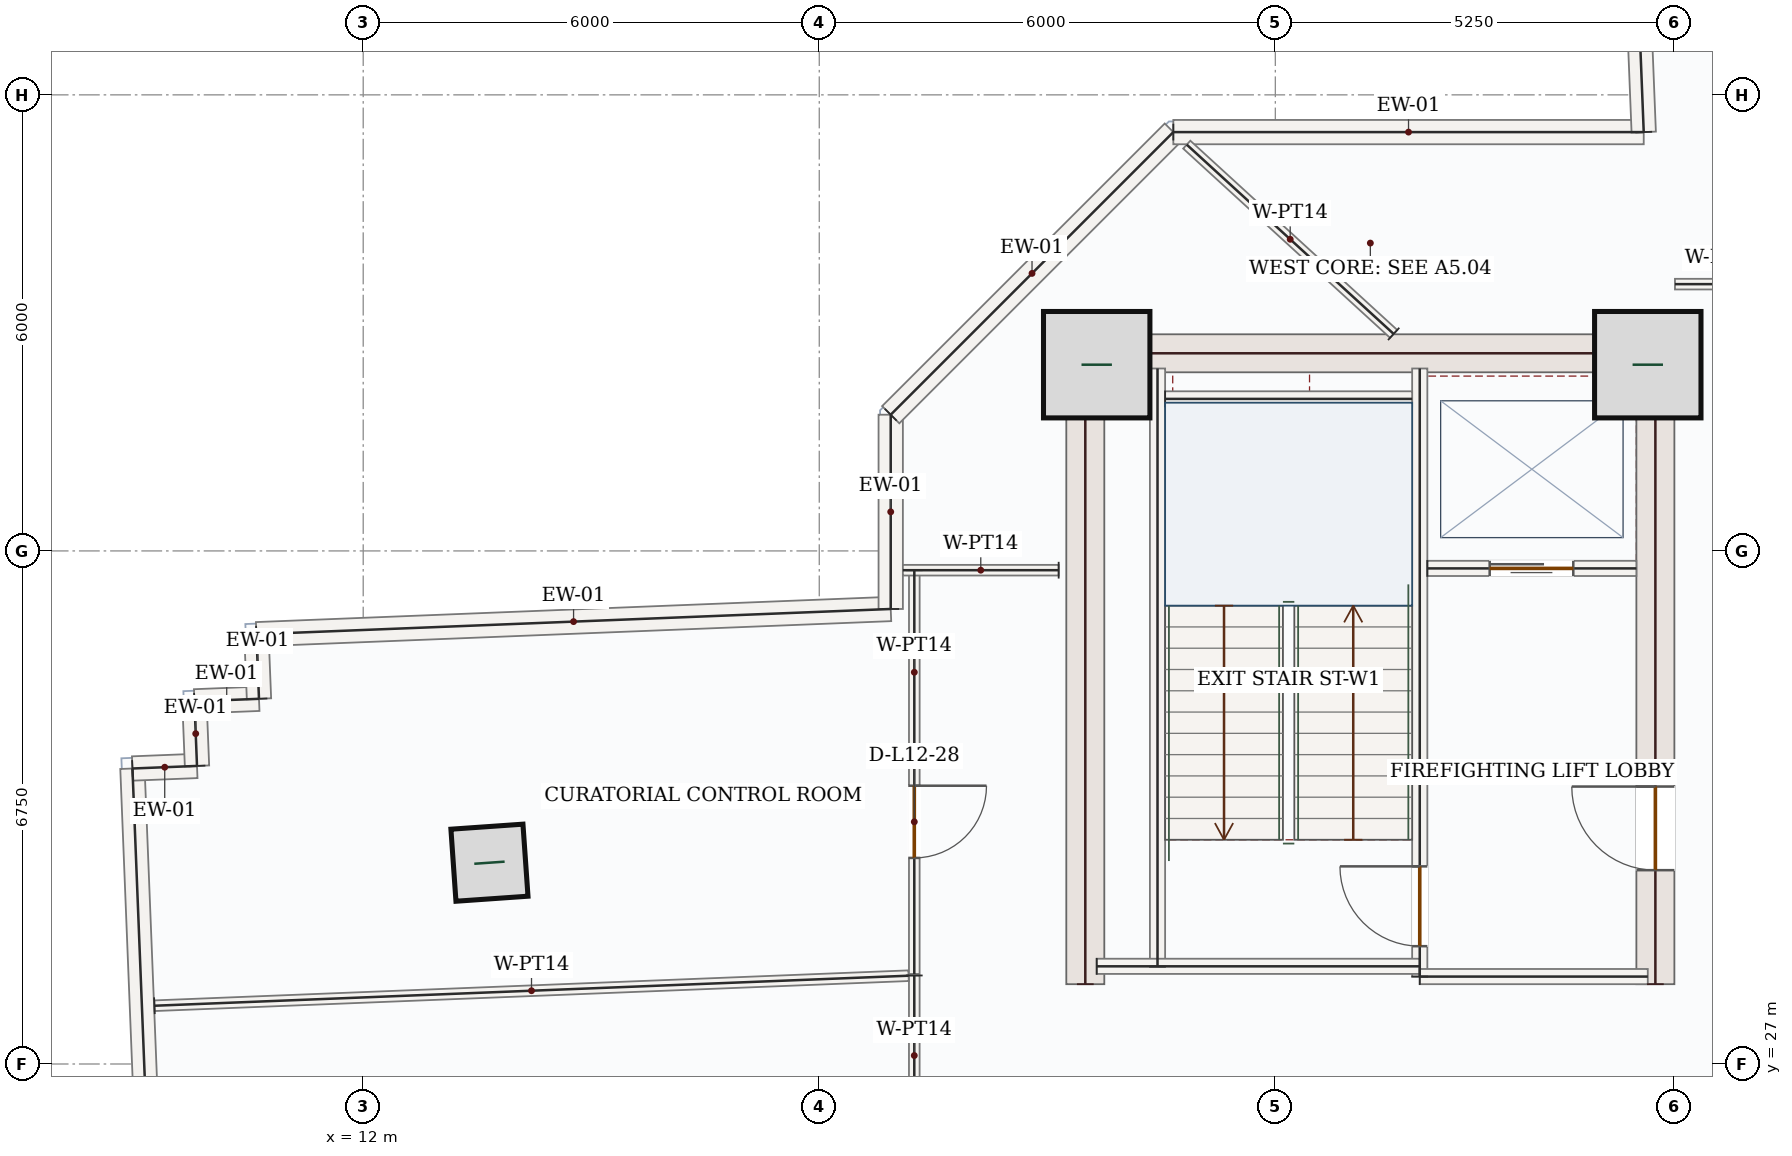
"""IFC4 building model, lengths in metres.
Left out: names, types, materials, properties, quantities, classifications, styles, units other than length and angle.
Written with IfcOpenShell. Run it as: python <this file> out.ifc"""

import sys

from ifc_helpers import new_model, si_unit, direction, frame, frame_2d, origin, origin_2d, place, context, subcontext, project, spatial, rectangle, hollow_rectangle, extrude, source, transform, mapped, element, fill, save


model = new_model("IFC4")
c1 = context("Model", 3, precision=1e-05, world=origin(), true_north=direction((0.0, 1.0)))
c2 = subcontext(c1, "Body", "Model", "MODEL_VIEW")
j1 = project(units=[si_unit("LENGTHUNIT", "METRE"), si_unit("PLANEANGLEUNIT", "RADIAN")], contexts=[c1])
p1 = place(None, origin())
s1 = spatial("IfcSite", under=j1, at=p1, CompositionType="ELEMENT")
p2 = place(p1, origin())
s2 = spatial("IfcBuilding", under=s1, at=p2, CompositionType="ELEMENT")
p3 = place(p2, frame((0.0, 0.0, 58.5)))
s3 = spatial("IfcBuildingStorey", under=s2, at=p3, CompositionType="ELEMENT", Elevation=58.5)
m1 = source(origin(), c2, "Body", "SweptSolid", [
    extrude(rectangle(XDim=8.55, YDim=0.5, at=frame_2d((4.275, 0.0))), origin(), (0.0, 0.0, 1.0), 3.95),
])
p4 = place(p3, frame((21.5, 28.05, 0.0), z_axis=(0.0, 0.0, 1.0), x_axis=(0.0, 1.0, 0.0)))
e1 = element("IfcWall", 1, at=p4, inside=s3, PredefinedType="SHEAR", context=c2, shape_type="MappedRepresentation", body=[
    mapped(m1, transform((0.0, 0.0, 0.0), x_axis=(1.0, 0.0, 0.0), y_axis=(0.0, 1.0, 0.0), z_axis=(0.0, 0.0, 1.0), scale=1.0)),
])
p5 = place(p3, frame((29.0, 28.05, 0.0), z_axis=(0.0, 0.0, 1.0), x_axis=(0.0, 1.0, 0.0)))
e2 = element("IfcWall", 2, at=p5, inside=s3, PredefinedType="SHEAR", context=c2, shape_type="SweptSolid", body=[
    extrude(rectangle(XDim=8.55, YDim=0.5, at=frame_2d((4.275, 0.0))), origin(), (0.0, 0.0, 1.0), 3.95),
])
p6 = place(p5, frame((1.5, 0.0, 0.0)))
e3 = element("IfcOpeningElement", 3, at=p6, cuts=e2, PredefinedType="OPENING", context=c2, shape_type="SweptSolid", body=[
    extrude(rectangle(XDim=1.1, YDim=2.2, at=frame_2d((0.55, 1.1))), frame((0.0, 0.26, 0.0), z_axis=(0.0, -1.0, 0.0), x_axis=(1.0, 0.0, 0.0)), (0.0, 0.0, 1.0), 0.52),
])
m2 = source(origin(), c2, "Body", "SweptSolid", [
    extrude(rectangle(XDim=7.0, YDim=0.5, at=frame_2d((3.5, 0.0))), origin(), (0.0, 0.0, 1.0), 3.95),
])
p7 = place(p3, frame((21.75, 36.35, 0.0), z_axis=(0.0, 0.0, 1.0), x_axis=(1.0, 0.0, 0.0)))
e4 = element("IfcWall", 4, at=p7, inside=s3, PredefinedType="SHEAR", context=c2, shape_type="MappedRepresentation", body=[
    mapped(m2, transform((0.0, 0.0, 0.0), x_axis=(1.0, 0.0, 0.0), y_axis=(0.0, 1.0, 0.0), z_axis=(0.0, 0.0, 1.0), scale=1.0)),
])
m3 = source(origin(), c2, "Body", "SweptSolid", [
    extrude(rectangle(XDim=1.4, YDim=1.4, at=origin_2d()), origin(), (0.0, 0.0, 1.0), 4.2),
])
for number, where, z_axis, x_axis in (
    (5, (21.65, 36.2, 0.0), (0.0, 0.0, 1.0), (1.0, 0.0, 0.0)),
    (6, (28.9, 36.2, 0.0), (0.0, 0.0, 1.0), (1.0, 0.0, 0.0)),
):
    element("IfcColumn", number, at=place(p3, frame(where, z_axis=z_axis, x_axis=x_axis)), inside=s3, PredefinedType="COLUMN", context=c2, shape_type="MappedRepresentation", body=[
        mapped(m3, transform((0.0, 0.0, 0.0), x_axis=(1.0, 0.0, 0.0), y_axis=(0.0, 1.0, 0.0), z_axis=(0.0, 0.0, 1.0), scale=1.0)),
    ])
m4 = source(origin(), c2, "Body", "SweptSolid", [
    extrude(hollow_rectangle(XDim=0.95, YDim=0.95, WallThickness=0.05, at=origin_2d()), origin(), (0.0, 0.0, 1.0), 4.2),
])
p8 = place(p3, frame((13.661, 29.648, 0.0), z_axis=(0.0, 0.0, 1.0), x_axis=(0.99756405026, 0.069756473744, 0.0)))
e7 = element("IfcColumn", 7, at=p8, inside=s3, PredefinedType="COLUMN", context=c2, shape_type="MappedRepresentation", body=[
    mapped(m4, transform((0.0, 0.0, 0.0), x_axis=(1.0, 0.0, 0.0), y_axis=(0.0, 1.0, 0.0), z_axis=(0.0, 0.0, 1.0), scale=1.0)),
])
m5 = source(origin(), c2, "Body", "SweptSolid", [
    extrude(rectangle(XDim=9.92, YDim=0.32, at=frame_2d((4.96, 0.0))), origin(), (0.0, 0.0, 1.0), 3.95),
])
p9 = place(p3, frame((9.359, 20.975, 0.0), z_axis=(0.0, 0.0, 1.0), x_axis=(-0.03977146366, 0.999208802342, 0.0)))
e8 = element("IfcWall", 8, at=p9, inside=s3, PredefinedType="SOLIDWALL", context=c2, shape_type="MappedRepresentation", body=[
    mapped(m5, transform((0.0, 0.0, 0.0), x_axis=(1.0, 0.0, 0.0), y_axis=(0.0, 1.0, 0.0), z_axis=(0.0, 0.0, 1.0), scale=1.0)),
])
m6 = source(origin(), c2, "Body", "SweptSolid", [
    extrude(rectangle(XDim=0.85, YDim=0.32, at=frame_2d((0.425, 0.0))), origin(), (0.0, 0.0, 1.0), 3.95),
])
p10 = place(p3, frame((8.964, 30.887, 0.0), z_axis=(0.0, 0.0, 1.0), x_axis=(0.999202334929, 0.039933618331, 0.0)))
e9 = element("IfcWall", 9, at=p10, inside=s3, PredefinedType="SOLIDWALL", context=c2, shape_type="MappedRepresentation", body=[
    mapped(m6, transform((0.0, 0.0, 0.0), x_axis=(1.0, 0.0, 0.0), y_axis=(0.0, 1.0, 0.0), z_axis=(0.0, 0.0, 1.0), scale=1.0)),
])
m7 = source(origin(), c2, "Body", "SweptSolid", [
    extrude(rectangle(XDim=0.85, YDim=0.32, at=frame_2d((0.425, 0.0))), origin(), (0.0, 0.0, 1.0), 3.95),
])
for number, where, z_axis, x_axis in (
    (10, (9.813, 30.921, 0.0), (0.0, 0.0, 1.0), (-0.04, 0.999, 0.0)),
    (11, (9.78, 31.771, 0.0), (0.0, 0.0, 1.0), (0.999, 0.04, 0.0)),
    (12, (10.629, 31.804, 0.0), (0.0, 0.0, 1.0), (-0.04, 0.999, 0.0)),
):
    element("IfcWall", number, at=place(p3, frame(where, z_axis=z_axis, x_axis=x_axis)), inside=s3, PredefinedType="SOLIDWALL", context=c2, shape_type="MappedRepresentation", body=[
        mapped(m7, transform((0.0, 0.0, 0.0), x_axis=(1.0, 0.0, 0.0), y_axis=(0.0, 1.0, 0.0), z_axis=(0.0, 0.0, 1.0), scale=1.0)),
    ])
m8 = source(origin(), c2, "Body", "SweptSolid", [
    extrude(rectangle(XDim=8.352, YDim=0.32, at=frame_2d((4.176, 0.0))), origin(), (0.0, 0.0, 1.0), 3.95),
])
p11 = place(p3, frame((10.595, 32.654, 0.0), z_axis=(0.0, 0.0, 1.0), x_axis=(0.999208226989, 0.039785916063, 0.0)))
e13 = element("IfcWall", 13, at=p11, inside=s3, PredefinedType="SOLIDWALL", context=c2, shape_type="MappedRepresentation", body=[
    mapped(m8, transform((0.0, 0.0, 0.0), x_axis=(1.0, 0.0, 0.0), y_axis=(0.0, 1.0, 0.0), z_axis=(0.0, 0.0, 1.0), scale=1.0)),
])
m9 = source(origin(), c2, "Body", "SweptSolid", [
    extrude(rectangle(XDim=2.556, YDim=0.32, at=frame_2d((1.278, 0.0))), origin(), (0.0, 0.0, 1.0), 3.95),
])
p12 = place(p3, frame((18.94, 32.986, 0.0), z_axis=(0.0, 0.0, 1.0), x_axis=(0.0, 1.0, 0.0)))
e14 = element("IfcWall", 14, at=p12, inside=s3, PredefinedType="SOLIDWALL", context=c2, shape_type="MappedRepresentation", body=[
    mapped(m9, transform((0.0, 0.0, 0.0), x_axis=(1.0, 0.0, 0.0), y_axis=(0.0, 1.0, 0.0), z_axis=(0.0, 0.0, 1.0), scale=1.0)),
])
m10 = source(origin(), c2, "Body", "SweptSolid", [
    extrude(rectangle(XDim=5.258, YDim=0.32, at=frame_2d((2.629, 0.0))), origin(), (0.0, 0.0, 1.0), 3.95),
])
p13 = place(p3, frame((18.94, 35.542, 0.0), z_axis=(0.0, 0.0, 1.0), x_axis=(0.707106781187, 0.707106781187, 0.0)))
e15 = element("IfcWall", 15, at=p13, inside=s3, PredefinedType="SOLIDWALL", context=c2, shape_type="MappedRepresentation", body=[
    mapped(m10, transform((0.0, 0.0, 0.0), x_axis=(1.0, 0.0, 0.0), y_axis=(0.0, 1.0, 0.0), z_axis=(0.0, 0.0, 1.0), scale=1.0)),
])
m11 = source(origin(), c2, "Body", "SweptSolid", [
    extrude(rectangle(XDim=6.189, YDim=0.32, at=frame_2d((3.094, 0.0))), origin(), (0.0, 0.0, 1.0), 3.95),
])
p14 = place(p3, frame((22.658, 39.26, 0.0), z_axis=(0.0, 0.0, 1.0), x_axis=(1.0, 0.0, 0.0)))
e16 = element("IfcWall", 16, at=p14, inside=s3, PredefinedType="SOLIDWALL", context=c2, shape_type="MappedRepresentation", body=[
    mapped(m11, transform((0.0, 0.0, 0.0), x_axis=(1.0, 0.0, 0.0), y_axis=(0.0, 1.0, 0.0), z_axis=(0.0, 0.0, 1.0), scale=1.0)),
])
m12 = source(origin(), c2, "Body", "SweptSolid", [
    extrude(rectangle(XDim=11.625, YDim=0.32, at=frame_2d((5.812, 0.0))), origin(), (0.0, 0.0, 1.0), 3.95),
])
p15 = place(p3, frame((28.847, 39.26, 0.0), z_axis=(0.0, 0.0, 1.0), x_axis=(-0.039775975357, 0.999208622753, 0.0)))
e17 = element("IfcWall", 17, at=p15, inside=s3, PredefinedType="SOLIDWALL", context=c2, shape_type="MappedRepresentation", body=[
    mapped(m12, transform((0.0, 0.0, 0.0), x_axis=(1.0, 0.0, 0.0), y_axis=(0.0, 1.0, 0.0), z_axis=(0.0, 0.0, 1.0), scale=1.0)),
])
m13 = source(origin(), c2, "Body", "SweptSolid", [
    extrude(rectangle(XDim=7.87, YDim=0.2, at=frame_2d((3.935, 0.0))), origin(), (0.0, 0.0, 1.0), 3.95),
])
p16 = place(p3, frame((22.45, 28.28, 0.0), z_axis=(0.0, 0.0, 1.0), x_axis=(0.0, 1.0, 0.0)))
e18 = element("IfcWall", 18, at=p16, inside=s3, PredefinedType="SOLIDWALL", context=c2, shape_type="MappedRepresentation", body=[
    mapped(m13, transform((0.0, 0.0, 0.0), x_axis=(1.0, 0.0, 0.0), y_axis=(0.0, 1.0, 0.0), z_axis=(0.0, 0.0, 1.0), scale=1.0)),
])
p17 = place(p3, frame((25.9, 28.15, 0.0), z_axis=(0.0, 0.0, 1.0), x_axis=(0.0, 1.0, 0.0)))
e19 = element("IfcWall", 19, at=p17, inside=s3, PredefinedType="SOLIDWALL", context=c2, shape_type="SweptSolid", body=[
    extrude(rectangle(XDim=8.0, YDim=0.2, at=frame_2d((4.0, 0.0))), origin(), (0.0, 0.0, 1.0), 3.95),
])
p18 = place(p17, frame((0.4, 0.0, 0.0)))
e20 = element("IfcOpeningElement", 20, at=p18, cuts=e19, PredefinedType="OPENING", context=c2, shape_type="SweptSolid", body=[
    extrude(rectangle(XDim=1.05, YDim=2.15, at=frame_2d((0.525, 1.075))), frame((0.0, 0.11, 0.0), z_axis=(0.0, -1.0, 0.0), x_axis=(1.0, 0.0, 0.0)), (0.0, 0.0, 1.0), 0.22),
])
m14 = source(origin(), c2, "Body", "SweptSolid", [
    extrude(rectangle(XDim=4.25, YDim=0.2, at=frame_2d((2.125, 0.0))), origin(), (0.0, 0.0, 1.0), 3.95),
])
p19 = place(p3, frame((21.65, 28.285, 0.0), z_axis=(0.0, 0.0, 1.0), x_axis=(1.0, 0.0, 0.0)))
e21 = element("IfcWall", 21, at=p19, inside=s3, PredefinedType="SOLIDWALL", context=c2, shape_type="MappedRepresentation", body=[
    mapped(m14, transform((0.0, 0.0, 0.0), x_axis=(1.0, 0.0, 0.0), y_axis=(0.0, 1.0, 0.0), z_axis=(0.0, 0.0, 1.0), scale=1.0)),
])
m15 = source(origin(), c2, "Body", "SweptSolid", [
    extrude(rectangle(XDim=3.0, YDim=0.2, at=frame_2d((1.5, 0.0))), origin(), (0.0, 0.0, 1.0), 3.95),
])
p20 = place(p3, frame((25.9, 28.15, 0.0), z_axis=(0.0, 0.0, 1.0), x_axis=(1.0, 0.0, 0.0)))
e22 = element("IfcWall", 22, at=p20, inside=s3, PredefinedType="SOLIDWALL", context=c2, shape_type="MappedRepresentation", body=[
    mapped(m15, transform((0.0, 0.0, 0.0), x_axis=(1.0, 0.0, 0.0), y_axis=(0.0, 1.0, 0.0), z_axis=(0.0, 0.0, 1.0), scale=1.0)),
])
m16 = source(origin(), c2, "Body", "SweptSolid", [
    extrude(rectangle(XDim=3.25, YDim=0.2, at=frame_2d((1.625, 0.0))), origin(), (0.0, 0.0, 1.0), 3.95),
])
p21 = place(p3, frame((22.55, 35.75, 0.0), z_axis=(0.0, 0.0, 1.0), x_axis=(1.0, 0.0, 0.0)))
e23 = element("IfcWall", 23, at=p21, inside=s3, PredefinedType="SOLIDWALL", context=c2, shape_type="MappedRepresentation", body=[
    mapped(m16, transform((0.0, 0.0, 0.0), x_axis=(1.0, 0.0, 0.0), y_axis=(0.0, 1.0, 0.0), z_axis=(0.0, 0.0, 1.0), scale=1.0)),
])
p22 = place(p3, frame((26.0, 33.52, 0.0), z_axis=(0.0, 0.0, 1.0), x_axis=(1.0, 0.0, 0.0)))
e24 = element("IfcWall", 24, at=p22, inside=s3, PredefinedType="SOLIDWALL", context=c2, shape_type="SweptSolid", body=[
    extrude(rectangle(XDim=2.75, YDim=0.2, at=frame_2d((1.375, 0.0))), origin(), (0.0, 0.0, 1.0), 3.95),
])
p23 = place(p22, frame((0.82, 0.0, 0.0)))
e25 = element("IfcOpeningElement", 25, at=p23, cuts=e24, PredefinedType="OPENING", context=c2, shape_type="SweptSolid", body=[
    extrude(rectangle(XDim=1.1, YDim=2.15, at=frame_2d((0.55, 1.075))), frame((0.0, 0.11, 0.0), z_axis=(0.0, -1.0, 0.0), x_axis=(1.0, 0.0, 0.0)), (0.0, 0.0, 1.0), 0.22),
])
p24 = place(p3, frame((19.25, 28.165, 0.0), z_axis=(0.0, 0.0, 1.0), x_axis=(0.0, -1.0, 0.0)))
e26 = element("IfcWall", 26, at=p24, inside=s3, PredefinedType="PARTITIONING", context=c2, shape_type="SweptSolid", body=[
    extrude(rectangle(XDim=3.843, YDim=0.14, at=frame_2d((1.921, 0.0))), origin(), (0.0, 0.0, 1.0), 3.95),
])
p25 = place(p24, frame((2.257, 0.0, 0.0)))
e27 = element("IfcOpeningElement", 27, at=p25, cuts=e26, PredefinedType="OPENING", context=c2, shape_type="SweptSolid", body=[
    extrude(rectangle(XDim=0.95, YDim=2.15, at=frame_2d((0.475, 1.075))), frame((0.0, 0.08, 0.0), z_axis=(0.0, -1.0, 0.0), x_axis=(1.0, 0.0, 0.0)), (0.0, 0.0, 1.0), 0.16),
])
m17 = source(origin(), c2, "Body", "SweptSolid", [
    extrude(rectangle(XDim=9.929, YDim=0.14, at=frame_2d((4.965, 0.0))), origin(), (0.0, 0.0, 1.0), 3.95),
])
p26 = place(p3, frame((9.253, 27.767, 0.0), z_axis=(0.0, 0.0, 1.0), x_axis=(0.999208364847, 0.039782453661, 0.0)))
e28 = element("IfcWall", 28, at=p26, inside=s3, PredefinedType="PARTITIONING", context=c2, shape_type="MappedRepresentation", body=[
    mapped(m17, transform((0.0, 0.0, 0.0), x_axis=(1.0, 0.0, 0.0), y_axis=(0.0, 1.0, 0.0), z_axis=(0.0, 0.0, 1.0), scale=1.0)),
])
p27 = place(p3, frame((32.004, 37.26, 0.0), z_axis=(0.0, 0.0, 1.0), x_axis=(-0.999999996048, -8.8904694e-05, 0.0)))
e29 = element("IfcWall", 29, at=p27, inside=s3, PredefinedType="PARTITIONING", context=c2, shape_type="SweptSolid", body=[
    extrude(rectangle(XDim=2.746, YDim=0.14, at=frame_2d((1.373, 0.0))), origin(), (0.0, 0.0, 1.0), 3.95),
])
p28 = place(p27, frame((0.395, 0.0, 0.0)))
e30 = element("IfcOpeningElement", 30, at=p28, cuts=e29, PredefinedType="OPENING", context=c2, shape_type="SweptSolid", body=[
    extrude(rectangle(XDim=0.95, YDim=2.15, at=frame_2d((0.475, 1.075))), frame((0.0, 0.08, 0.0), z_axis=(0.0, -1.0, 0.0), x_axis=(1.0, 0.0, 0.0)), (0.0, 0.0, 1.0), 0.16),
])
m18 = source(origin(), c2, "Body", "SweptSolid", [
    extrude(rectangle(XDim=3.689, YDim=0.14, at=frame_2d((1.844, 0.0))), origin(), (0.0, 0.0, 1.0), 3.95),
])
p29 = place(p3, frame((25.557, 36.605, 0.0), z_axis=(0.0, 0.0, 1.0), x_axis=(-0.737843279395, 0.674972069831, 0.0)))
e31 = element("IfcWall", 31, at=p29, inside=s3, PredefinedType="PARTITIONING", context=c2, shape_type="MappedRepresentation", body=[
    mapped(m18, transform((0.0, 0.0, 0.0), x_axis=(1.0, 0.0, 0.0), y_axis=(0.0, 1.0, 0.0), z_axis=(0.0, 0.0, 1.0), scale=1.0)),
])
p30 = place(p3, frame((19.25, 33.496, 0.0), z_axis=(0.0, 0.0, 1.0), x_axis=(-9.1924438e-05, -0.999999995775, 0.0)))
e32 = element("IfcWall", 32, at=p30, inside=s3, PredefinedType="PARTITIONING", context=c2, shape_type="SweptSolid", body=[
    extrude(rectangle(XDim=5.312, YDim=0.14, at=frame_2d((2.656, 0.0))), origin(), (0.0, 0.0, 1.0), 3.95),
])
p31 = place(p30, frame((2.835, 0.0, 0.0)))
e33 = element("IfcOpeningElement", 33, at=p31, cuts=e32, PredefinedType="OPENING", context=c2, shape_type="SweptSolid", body=[
    extrude(rectangle(XDim=0.95, YDim=2.15, at=frame_2d((0.475, 1.075))), frame((0.0, 0.08, 0.0), z_axis=(0.0, -1.0, 0.0), x_axis=(1.0, 0.0, 0.0)), (0.0, 0.0, 1.0), 0.16),
])
m19 = source(origin(), c2, "Body", "SweptSolid", [
    extrude(rectangle(XDim=2.049, YDim=0.14, at=frame_2d((1.025, 0.0))), origin(), (0.0, 0.0, 1.0), 3.95),
])
p32 = place(p3, frame((21.149, 33.497, 0.0), z_axis=(0.0, 0.0, 1.0), x_axis=(-0.999999992904, -0.000119132713, 0.0)))
e34 = element("IfcWall", 34, at=p32, inside=s3, PredefinedType="PARTITIONING", context=c2, shape_type="MappedRepresentation", body=[
    mapped(m19, transform((0.0, 0.0, 0.0), x_axis=(1.0, 0.0, 0.0), y_axis=(0.0, 1.0, 0.0), z_axis=(0.0, 0.0, 1.0), scale=1.0)),
])
m20 = source(origin(), c2, "Body", "SweptSolid", [
    extrude(rectangle(XDim=1.05, YDim=2.15, at=frame_2d((0.525, 1.075))), frame((0.0, 0.025, 0.0), z_axis=(0.0, -1.0, 0.0), x_axis=(1.0, 0.0, 0.0)), (0.0, 0.0, 1.0), 0.05),
])
p33 = place(p18, origin())
e35 = element("IfcDoor", 35, at=p33, inside=s3, OperationType="SINGLE_SWING_RIGHT", PredefinedType="DOOR", context=c2, shape_type="MappedRepresentation", body=[
    mapped(m20, transform((0.0, 0.0, 0.0), x_axis=(1.0, 0.0, 0.0), y_axis=(0.0, 1.0, 0.0), z_axis=(0.0, 0.0, 1.0), scale=1.0)),
])
fill(e20, e35)
m21 = source(origin(), c2, "Body", "SweptSolid", [
    extrude(rectangle(XDim=1.1, YDim=2.15, at=frame_2d((0.55, 1.075))), frame((0.0, 0.025, 0.0), z_axis=(0.0, -1.0, 0.0), x_axis=(1.0, 0.0, 0.0)), (0.0, 0.0, 1.0), 0.05),
])
p34 = place(p23, origin())
e36 = element("IfcDoor", 36, at=p34, inside=s3, OperationType="DOUBLE_DOOR_SLIDING", PredefinedType="DOOR", context=c2, shape_type="MappedRepresentation", body=[
    mapped(m21, transform((0.0, 0.0, 0.0), x_axis=(1.0, 0.0, 0.0), y_axis=(0.0, 1.0, 0.0), z_axis=(0.0, 0.0, 1.0), scale=1.0)),
])
fill(e25, e36)
m22 = source(origin(), c2, "Body", "SweptSolid", [
    extrude(rectangle(XDim=1.1, YDim=2.2, at=frame_2d((0.55, 1.1))), frame((0.0, 0.025, 0.0), z_axis=(0.0, -1.0, 0.0), x_axis=(1.0, 0.0, 0.0)), (0.0, 0.0, 1.0), 0.05),
])
p35 = place(p6, origin())
e37 = element("IfcDoor", 37, at=p35, inside=s3, OperationType="SINGLE_SWING_RIGHT", PredefinedType="DOOR", context=c2, shape_type="MappedRepresentation", body=[
    mapped(m22, transform((0.0, 0.0, 0.0), x_axis=(1.0, 0.0, 0.0), y_axis=(0.0, 1.0, 0.0), z_axis=(0.0, 0.0, 1.0), scale=1.0)),
])
fill(e3, e37)
m23 = source(origin(), c2, "Body", "SweptSolid", [
    extrude(rectangle(XDim=0.95, YDim=2.15, at=frame_2d((0.475, 1.075))), frame((0.0, 0.025, 0.0), z_axis=(0.0, -1.0, 0.0), x_axis=(1.0, 0.0, 0.0)), (0.0, 0.0, 1.0), 0.05),
])
p36 = place(p31, origin())
e38 = element("IfcDoor", 38, at=p36, inside=s3, OperationType="SINGLE_SWING_LEFT", PredefinedType="DOOR", context=c2, shape_type="MappedRepresentation", body=[
    mapped(m23, transform((0.0, 0.0, 0.0), x_axis=(1.0, 0.0, 0.0), y_axis=(0.0, 1.0, 0.0), z_axis=(0.0, 0.0, 1.0), scale=1.0)),
])
fill(e33, e38)
save(model, sys.argv[1])
